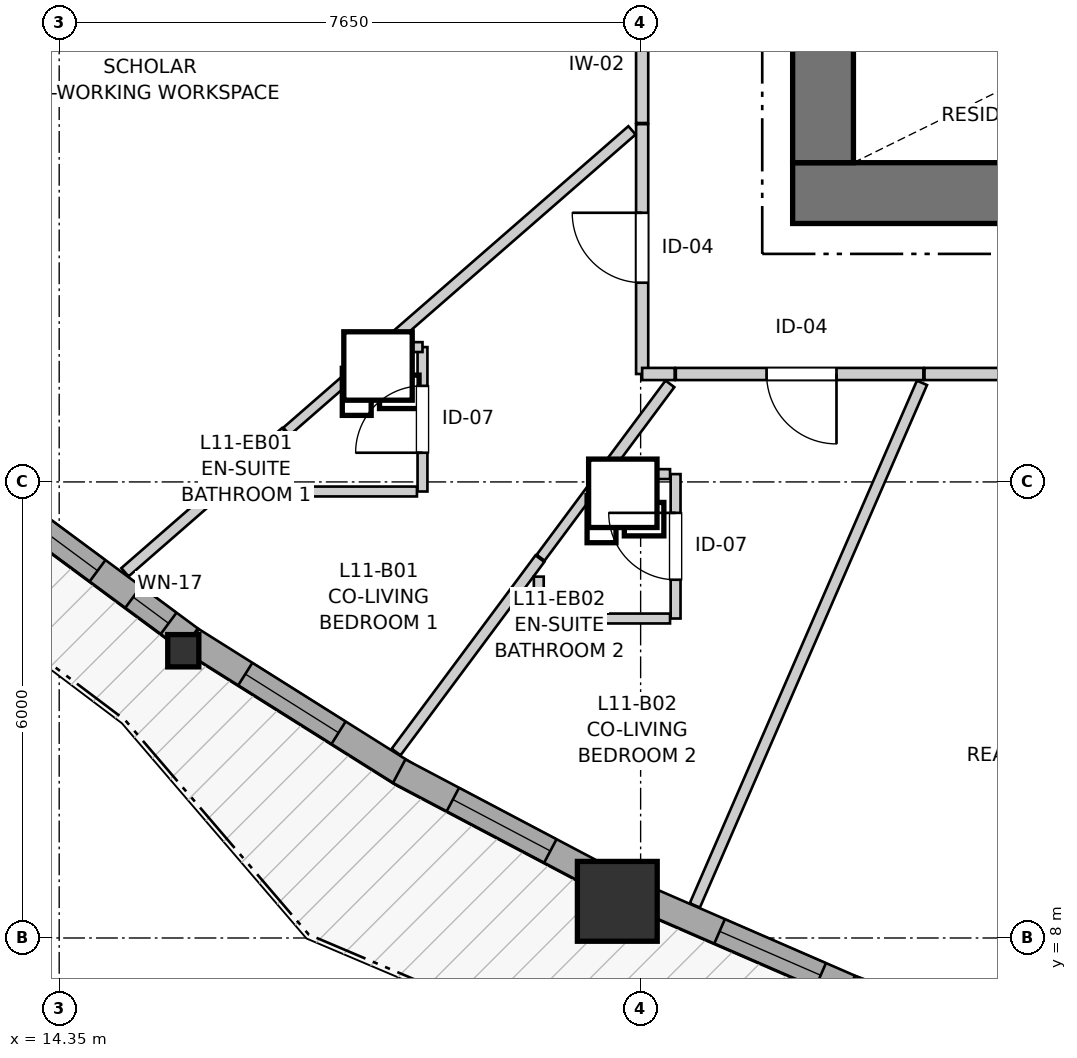
"""IFC4 building model, lengths in metres.
Left out: names, types, materials, properties, quantities, classifications, styles, units other than length and angle.
Written with IfcOpenShell. Run it as: python <this file> out.ifc"""

import sys

from ifc_helpers import new_model, si_unit, direction, frame, frame_2d, origin, origin_2d, place, context, subcontext, project, spatial, rectangle, i_section, extrude, source, transform, mapped, element, fill, save


model = new_model("IFC4")
c1 = context("Model", 3, precision=1e-05, world=origin(), true_north=direction((0.0, 1.0)))
c2 = subcontext(c1, "Body", "Model", "MODEL_VIEW")
j1 = project(units=[si_unit("LENGTHUNIT", "METRE"), si_unit("PLANEANGLEUNIT", "RADIAN")], contexts=[c1])
p1 = place(None, origin())
s1 = spatial("IfcSite", under=j1, at=p1, CompositionType="ELEMENT")
p2 = place(p1, origin())
s2 = spatial("IfcBuilding", under=s1, at=p2, CompositionType="ELEMENT")
p3 = place(p2, frame((0.0, 0.0, 39.8)))
s3 = spatial("IfcBuildingStorey", under=s2, at=p3, CompositionType="ELEMENT", Elevation=39.8)
p4 = place(p3, frame((24.0, 17.8, 0.0), z_axis=(0.0, 0.0, 1.0), x_axis=(1.0, 0.0, 0.0)))
e1 = element("IfcWall", 1, at=p4, inside=s3, PredefinedType="SHEAR", context=c2, shape_type="SweptSolid", body=[
    extrude(rectangle(XDim=12.7, YDim=0.8, at=frame_2d((6.35, 0.0))), origin(), (0.0, 0.0, 1.0), 2.94),
])
p5 = place(p3, frame((24.4, 33.8, 0.0), z_axis=(0.0, 0.0, 1.0), x_axis=(0.0, -1.0, 0.0)))
e2 = element("IfcWall", 2, at=p5, inside=s3, PredefinedType="SHEAR", context=c2, shape_type="SweptSolid", body=[
    extrude(rectangle(XDim=15.6, YDim=0.8, at=frame_2d((7.8, 0.0))), origin(), (0.0, 0.0, 1.0), 2.94),
])
p6 = place(p5, frame((7.05, 0.0, 0.0)))
e3 = element("IfcOpeningElement", 3, at=p6, cuts=e2, PredefinedType="OPENING", context=c2, shape_type="SweptSolid", body=[
    extrude(rectangle(XDim=1.5, YDim=2.15, at=frame_2d((0.75, 1.075))), frame((0.0, 0.41, 0.0), z_axis=(0.0, -1.0, 0.0), x_axis=(1.0, 0.0, 0.0)), (0.0, 0.0, 1.0), 0.82),
])
p7 = place(p5, frame((3.52, 0.0, 0.0)))
e4 = element("IfcOpeningElement", 4, at=p7, cuts=e2, PredefinedType="OPENING", context=c2, shape_type="SweptSolid", body=[
    extrude(rectangle(XDim=0.86, YDim=2.05, at=frame_2d((0.43, 1.025))), frame((0.0, 0.41, 0.0), z_axis=(0.0, -1.0, 0.0), x_axis=(1.0, 0.0, 0.0)), (0.0, 0.0, 1.0), 0.82),
])
p8 = place(p5, frame((11.22, 0.0, 0.0)))
e5 = element("IfcOpeningElement", 5, at=p8, cuts=e2, PredefinedType="OPENING", context=c2, shape_type="SweptSolid", body=[
    extrude(rectangle(XDim=0.86, YDim=2.05, at=frame_2d((0.43, 1.025))), frame((0.0, 0.41, 0.0), z_axis=(0.0, -1.0, 0.0), x_axis=(1.0, 0.0, 0.0)), (0.0, 0.0, 1.0), 0.82),
])
m1 = source(origin(), c2, "Body", "SweptSolid", [
    extrude(i_section(OverallWidth=0.409, OverallDepth=0.425, WebThickness=0.03, FlangeThickness=0.048, FilletRadius=0.015, at=origin_2d()), origin(), (0.0, 0.0, 1.0), 2.94),
])
p9 = place(p3, frame((15.983, 11.779, 0.0), z_axis=(0.0, 0.0, 1.0), x_axis=(1.0, 0.0, 0.0)))
e6 = element("IfcColumn", 6, at=p9, inside=s3, PredefinedType="PILASTER", context=c2, shape_type="MappedRepresentation", body=[
    mapped(m1, transform((0.0, 0.0, 0.0), x_axis=(1.0, 0.0, 0.0), y_axis=(0.0, 1.0, 0.0), z_axis=(0.0, 0.0, 1.0), scale=1.0)),
])
m2 = source(origin(), c2, "Body", "SweptSolid", [
    extrude(rectangle(XDim=1.05, YDim=1.05, at=origin_2d()), origin(), (0.0, 0.0, 1.0), 2.94),
])
p10 = place(p3, frame((21.693, 8.482, 0.0), z_axis=(0.0, 0.0, 1.0), x_axis=(1.0, 0.0, 0.0)))
e7 = element("IfcColumn", 7, at=p10, inside=s3, PredefinedType="COLUMN", context=c2, shape_type="MappedRepresentation", body=[
    mapped(m2, transform((0.0, 0.0, 0.0), x_axis=(1.0, 0.0, 0.0), y_axis=(0.0, 1.0, 0.0), z_axis=(0.0, 0.0, 1.0), scale=1.0)),
])
p11 = place(p3, frame((13.389, 13.917, 0.0), z_axis=(0.0, 0.0, 1.0), x_axis=(0.803777512245, -0.594930004966, 0.0)))
e8 = element("IfcWall", 8, at=p11, inside=s3, PredefinedType="SOLIDWALL", context=c2, shape_type="SweptSolid", body=[
    extrude(rectangle(XDim=3.336, YDim=0.35, at=frame_2d((1.668, 0.0))), origin(), (0.0, 0.0, 1.0), 2.42),
])
p12 = place(p11, frame((0.374, 0.0, 0.82)))
e9 = element("IfcOpeningElement", 9, at=p12, cuts=e8, PredefinedType="OPENING", context=c2, shape_type="SweptSolid", body=[
    extrude(rectangle(XDim=1.45, YDim=1.25, at=frame_2d((0.725, 0.625))), frame((0.0, 0.185, 0.0), z_axis=(0.0, -1.0, 0.0), x_axis=(1.0, 0.0, 0.0)), (0.0, 0.0, 1.0), 0.37),
])
p13 = place(p11, frame((2.407, 0.0, 0.82)))
e10 = element("IfcOpeningElement", 10, at=p13, cuts=e8, PredefinedType="OPENING", context=c2, shape_type="SweptSolid", body=[
    extrude(rectangle(XDim=0.58, YDim=1.35, at=frame_2d((0.29, 0.675))), frame((0.0, 0.185, 0.0), z_axis=(0.0, -1.0, 0.0), x_axis=(1.0, 0.0, 0.0)), (0.0, 0.0, 1.0), 0.37),
])
p14 = place(p3, frame((16.093, 11.917, 0.0), z_axis=(0.0, 0.0, 1.0), x_axis=(0.846444167315, -0.532477484612, 0.0)))
e11 = element("IfcWall", 11, at=p14, inside=s3, PredefinedType="SOLIDWALL", context=c2, shape_type="SweptSolid", body=[
    extrude(rectangle(XDim=3.317, YDim=0.35, at=frame_2d((1.659, 0.0))), origin(), (0.0, 0.0, 1.0), 2.42),
])
p15 = place(p14, frame((0.834, 0.0, 0.82)))
e12 = element("IfcOpeningElement", 12, at=p15, cuts=e11, PredefinedType="OPENING", context=c2, shape_type="SweptSolid", body=[
    extrude(rectangle(XDim=1.45, YDim=1.25, at=frame_2d((0.725, 0.625))), frame((0.0, 0.185, 0.0), z_axis=(0.0, -1.0, 0.0), x_axis=(1.0, 0.0, 0.0)), (0.0, 0.0, 1.0), 0.37),
])
p16 = place(p3, frame((18.823, 10.195, 0.0), z_axis=(0.0, 0.0, 1.0), x_axis=(0.884422538795, -0.466687018108, 0.0)))
e13 = element("IfcWall", 13, at=p16, inside=s3, PredefinedType="SOLIDWALL", context=c2, shape_type="SweptSolid", body=[
    extrude(rectangle(XDim=3.037, YDim=0.35, at=frame_2d((1.519, 0.0))), origin(), (0.0, 0.0, 1.0), 2.42),
])
p17 = place(p16, frame((0.799, 0.0, 0.82)))
e14 = element("IfcOpeningElement", 14, at=p17, cuts=e13, PredefinedType="OPENING", context=c2, shape_type="SweptSolid", body=[
    extrude(rectangle(XDim=1.45, YDim=1.25, at=frame_2d((0.725, 0.625))), frame((0.0, 0.185, 0.0), z_axis=(0.0, -1.0, 0.0), x_axis=(1.0, 0.0, 0.0)), (0.0, 0.0, 1.0), 0.37),
])
p18 = place(p3, frame((22.038, 8.523, 0.0), z_axis=(0.0, 0.0, 1.0), x_axis=(0.91704973522, -0.398772846535, 0.0)))
e15 = element("IfcWall", 15, at=p18, inside=s3, PredefinedType="SOLIDWALL", context=c2, shape_type="SweptSolid", body=[
    extrude(rectangle(XDim=3.056, YDim=0.35, at=frame_2d((1.528, 0.0))), origin(), (0.0, 0.0, 1.0), 2.42),
])
p19 = place(p18, frame((1.092, 0.0, 0.82)))
e16 = element("IfcOpeningElement", 16, at=p19, cuts=e15, PredefinedType="OPENING", context=c2, shape_type="SweptSolid", body=[
    extrude(rectangle(XDim=1.45, YDim=1.25, at=frame_2d((0.725, 0.625))), frame((0.0, 0.185, 0.0), z_axis=(0.0, -1.0, 0.0), x_axis=(1.0, 0.0, 0.0)), (0.0, 0.0, 1.0), 0.37),
])
p20 = place(p3, frame((24.758, 7.337, 0.0), z_axis=(0.0, 0.0, 1.0), x_axis=(0.944146789085, -0.329525174547, 0.0)))
e17 = element("IfcWall", 17, at=p20, inside=s3, PredefinedType="SOLIDWALL", context=c2, shape_type="SweptSolid", body=[
    extrude(rectangle(XDim=3.374, YDim=0.35, at=frame_2d((1.687, 0.0))), origin(), (0.0, 0.0, 1.0), 2.42),
])
p21 = place(p20, frame((0.647, 0.0, 0.82)))
e18 = element("IfcOpeningElement", 18, at=p21, cuts=e17, PredefinedType="OPENING", context=c2, shape_type="SweptSolid", body=[
    extrude(rectangle(XDim=2.1, YDim=1.4, at=frame_2d((1.05, 0.7))), frame((0.0, 0.185, 0.0), z_axis=(0.0, -1.0, 0.0), x_axis=(1.0, 0.0, 0.0)), (0.0, 0.0, 1.0), 0.37),
])
p22 = place(p3, frame((22.02, 18.722, 0.0), z_axis=(0.0, 0.0, 1.0), x_axis=(0.0, 1.0, 0.0)))
e19 = element("IfcWall", 19, at=p22, inside=s3, PredefinedType="PARTITIONING", context=c2, shape_type="SweptSolid", body=[
    extrude(rectangle(XDim=5.428, YDim=0.16, at=frame_2d((2.714, 0.0))), origin(), (0.0, 0.0, 1.0), 2.94),
])
p23 = place(p22, frame((1.996, 0.0, 0.0)))
e20 = element("IfcOpeningElement", 20, at=p23, cuts=e19, PredefinedType="OPENING", context=c2, shape_type="SweptSolid", body=[
    extrude(rectangle(XDim=0.96, YDim=2.1, at=frame_2d((0.48, 1.05))), frame((0.0, 0.09, 0.0), z_axis=(0.0, -1.0, 0.0), x_axis=(1.0, 0.0, 0.0)), (0.0, 0.0, 1.0), 0.18),
])
p24 = place(p3, frame((30.849, 15.42, 0.0), z_axis=(0.0, 0.0, 1.0), x_axis=(-1.0, 0.0, 0.0)))
e21 = element("IfcWall", 21, at=p24, inside=s3, PredefinedType="PARTITIONING", context=c2, shape_type="SweptSolid", body=[
    extrude(rectangle(XDim=5.114, YDim=0.16, at=frame_2d((2.557, 0.0))), origin(), (0.0, 0.0, 1.0), 2.94),
])
p25 = place(p24, frame((2.076, 0.0, 0.0)))
e22 = element("IfcOpeningElement", 22, at=p25, cuts=e21, PredefinedType="OPENING", context=c2, shape_type="SweptSolid", body=[
    extrude(rectangle(XDim=0.96, YDim=2.1, at=frame_2d((0.48, 1.05))), frame((0.0, 0.09, 0.0), z_axis=(0.0, -1.0, 0.0), x_axis=(1.0, 0.0, 0.0)), (0.0, 0.0, 1.0), 0.18),
])
p26 = place(p3, frame((22.02, 15.42, 0.0), z_axis=(0.0, 0.0, 1.0), x_axis=(0.0, 1.0, 0.0)))
e23 = element("IfcWall", 23, at=p26, inside=s3, PredefinedType="PARTITIONING", context=c2, shape_type="SweptSolid", body=[
    extrude(rectangle(XDim=3.287, YDim=0.16, at=frame_2d((1.644, 0.0))), origin(), (0.0, 0.0, 1.0), 2.94),
])
p27 = place(p26, frame((1.201, 0.0, 0.0)))
e24 = element("IfcOpeningElement", 24, at=p27, cuts=e23, PredefinedType="OPENING", context=c2, shape_type="SweptSolid", body=[
    extrude(rectangle(XDim=0.92, YDim=2.1, at=frame_2d((0.46, 1.05))), frame((0.0, 0.09, 0.0), z_axis=(0.0, -1.0, 0.0), x_axis=(1.0, 0.0, 0.0)), (0.0, 0.0, 1.0), 0.18),
])
p28 = place(p3, frame((25.72, 15.42, 0.0), z_axis=(0.0, 0.0, 1.0), x_axis=(-1.0, 0.0, 0.0)))
e25 = element("IfcWall", 25, at=p28, inside=s3, PredefinedType="PARTITIONING", context=c2, shape_type="SweptSolid", body=[
    extrude(rectangle(XDim=3.257, YDim=0.16, at=frame_2d((1.628, 0.0))), origin(), (0.0, 0.0, 1.0), 2.94),
])
p29 = place(p28, frame((1.143, 0.0, 0.0)))
e26 = element("IfcOpeningElement", 26, at=p29, cuts=e25, PredefinedType="OPENING", context=c2, shape_type="SweptSolid", body=[
    extrude(rectangle(XDim=0.92, YDim=2.1, at=frame_2d((0.46, 1.05))), frame((0.0, 0.09, 0.0), z_axis=(0.0, -1.0, 0.0), x_axis=(1.0, 0.0, 0.0)), (0.0, 0.0, 1.0), 0.18),
])
p30 = place(p3, frame((22.46, 12.203, 0.0), z_axis=(0.0, 0.0, 1.0), x_axis=(0.0, 1.0, 0.0)))
e27 = element("IfcWall", 27, at=p30, inside=s3, PredefinedType="PARTITIONING", context=c2, shape_type="SweptSolid", body=[
    extrude(rectangle(XDim=1.9, YDim=0.13, at=frame_2d((0.95, 0.0))), origin(), (0.0, 0.0, 1.0), 2.94),
])
p31 = place(p30, frame((0.51, 0.0, 0.0)))
e28 = element("IfcOpeningElement", 28, at=p31, cuts=e27, PredefinedType="OPENING", context=c2, shape_type="SweptSolid", body=[
    extrude(rectangle(XDim=0.88, YDim=2.05, at=frame_2d((0.44, 1.025))), frame((0.0, 0.075, 0.0), z_axis=(0.0, -1.0, 0.0), x_axis=(1.0, 0.0, 0.0)), (0.0, 0.0, 1.0), 0.15),
])
p32 = place(p3, frame((19.13, 13.874, 0.0), z_axis=(0.0, 0.0, 1.0), x_axis=(0.0, 1.0, 0.0)))
e29 = element("IfcWall", 29, at=p32, inside=s3, PredefinedType="PARTITIONING", context=c2, shape_type="SweptSolid", body=[
    extrude(rectangle(XDim=1.9, YDim=0.13, at=frame_2d((0.95, 0.0))), origin(), (0.0, 0.0, 1.0), 2.94),
])
p33 = place(p32, frame((0.51, 0.0, 0.0)))
e30 = element("IfcOpeningElement", 30, at=p33, cuts=e29, PredefinedType="OPENING", context=c2, shape_type="SweptSolid", body=[
    extrude(rectangle(XDim=0.88, YDim=2.05, at=frame_2d((0.44, 1.025))), frame((0.0, 0.075, 0.0), z_axis=(0.0, -1.0, 0.0), x_axis=(1.0, 0.0, 0.0)), (0.0, 0.0, 1.0), 0.15),
])
p34 = place(p3, frame((22.713, 8.429, 0.0), z_axis=(0.0, 0.0, 1.0), x_axis=(0.398615352261, 0.917118204454, 0.0)))
e31 = element("IfcWall", 31, at=p34, inside=s3, PredefinedType="PARTITIONING", context=c2, shape_type="SweptSolid", body=[
    extrude(rectangle(XDim=7.496, YDim=0.145, at=frame_2d((3.748, 0.0))), origin(), (0.0, 0.0, 1.0), 2.94),
])
p35 = place(p3, frame((18.614, 15.774, 0.0), z_axis=(0.0, 0.0, 1.0), x_axis=(0.753902736672, 0.656986045239, 0.0)))
e32 = element("IfcWall", 32, at=p35, inside=s3, PredefinedType="PARTITIONING", context=c2, shape_type="SweptSolid", body=[
    extrude(rectangle(XDim=4.34, YDim=0.145, at=frame_2d((2.17, 0.0))), origin(), (0.0, 0.0, 1.0), 2.94),
])
p36 = place(p3, frame((18.783, 10.447, 0.0), z_axis=(0.0, 0.0, 1.0), x_axis=(0.596791765516, 0.80239615441, 0.0)))
e33 = element("IfcWall", 33, at=p36, inside=s3, PredefinedType="PARTITIONING", context=c2, shape_type="SweptSolid", body=[
    extrude(rectangle(XDim=3.17, YDim=0.145, at=frame_2d((1.585, 0.0))), origin(), (0.0, 0.0, 1.0), 2.94),
])
p37 = place(p3, frame((15.215, 12.812, 0.0), z_axis=(0.0, 0.0, 1.0), x_axis=(0.753874404049, 0.657018555993, 0.0)))
e34 = element("IfcWall", 34, at=p37, inside=s3, PredefinedType="PARTITIONING", context=c2, shape_type="SweptSolid", body=[
    extrude(rectangle(XDim=2.805, YDim=0.145, at=frame_2d((1.403, 0.0))), origin(), (0.0, 0.0, 1.0), 2.94),
])
p38 = place(p3, frame((17.33, 13.874, 0.0), z_axis=(0.0, 0.0, 1.0), x_axis=(1.0, 0.0, 0.0)))
e35 = element("IfcWall", 35, at=p38, inside=s3, PredefinedType="PARTITIONING", context=c2, shape_type="SweptSolid", body=[
    extrude(rectangle(XDim=1.727, YDim=0.13, at=frame_2d((0.863, 0.0))), origin(), (0.0, 0.0, 1.0), 2.94),
])
p39 = place(p3, frame((20.66, 12.203, 0.0), z_axis=(0.0, 0.0, 1.0), x_axis=(1.0, 0.0, 0.0)))
e36 = element("IfcWall", 36, at=p39, inside=s3, PredefinedType="PARTITIONING", context=c2, shape_type="SweptSolid", body=[
    extrude(rectangle(XDim=1.727, YDim=0.13, at=frame_2d((0.864, 0.0))), origin(), (0.0, 0.0, 1.0), 2.94),
])
p40 = place(p3, frame((17.341, 14.665, 0.0), z_axis=(0.0, 0.0, 1.0), x_axis=(0.753885757535, 0.657005528581, 0.0)))
e37 = element("IfcWall", 37, at=p40, inside=s3, PredefinedType="PARTITIONING", context=c2, shape_type="SweptSolid", body=[
    extrude(rectangle(XDim=1.673, YDim=0.13, at=frame_2d((0.837, 0.0))), origin(), (0.0, 0.0, 1.0), 2.94),
])
p41 = place(p3, frame((21.491, 14.088, 0.0), z_axis=(0.0, 0.0, 1.0), x_axis=(0.596893728005, 0.802320308523, 0.0)))
e38 = element("IfcWall", 38, at=p41, inside=s3, PredefinedType="PARTITIONING", context=c2, shape_type="SweptSolid", body=[
    extrude(rectangle(XDim=1.499, YDim=0.145, at=frame_2d((0.749, 0.0))), origin(), (0.0, 0.0, 1.0), 2.94),
])
p42 = place(p3, frame((20.684, 13.003, 0.0), z_axis=(0.0, 0.0, 1.0), x_axis=(0.596518903615, 0.802599026681, 0.0)))
e39 = element("IfcWall", 39, at=p42, inside=s3, PredefinedType="PARTITIONING", context=c2, shape_type="SweptSolid", body=[
    extrude(rectangle(XDim=1.337, YDim=0.13, at=frame_2d((0.669, 0.0))), origin(), (0.0, 0.0, 1.0), 2.94),
])
p43 = place(p3, frame((21.649, 14.103, 0.0), z_axis=(0.0, 0.0, 1.0), x_axis=(1.0, 0.0, 0.0)))
e40 = element("IfcWall", 40, at=p43, inside=s3, PredefinedType="PARTITIONING", context=c2, shape_type="SweptSolid", body=[
    extrude(rectangle(XDim=0.738, YDim=0.13, at=frame_2d((0.369, 0.0))), origin(), (0.0, 0.0, 1.0), 2.94),
])
p44 = place(p3, frame((17.33, 13.947, 0.0), z_axis=(0.0, 0.0, 1.0), x_axis=(0.0, 1.0, 0.0)))
e41 = element("IfcWall", 41, at=p44, inside=s3, PredefinedType="PARTITIONING", context=c2, shape_type="SweptSolid", body=[
    extrude(rectangle(XDim=0.547, YDim=0.13, at=frame_2d((0.273, 0.0))), origin(), (0.0, 0.0, 1.0), 2.94),
])
p45 = place(p3, frame((20.66, 12.276, 0.0), z_axis=(0.0, 0.0, 1.0), x_axis=(0.0, 1.0, 0.0)))
e42 = element("IfcWall", 42, at=p45, inside=s3, PredefinedType="PARTITIONING", context=c2, shape_type="SweptSolid", body=[
    extrude(rectangle(XDim=0.478, YDim=0.13, at=frame_2d((0.239, 0.0))), origin(), (0.0, 0.0, 1.0), 2.94),
])
p46 = place(p3, frame((18.749, 15.774, 0.0), z_axis=(0.0, 0.0, 1.0), x_axis=(1.0, 0.0, 0.0)))
e43 = element("IfcWall", 43, at=p46, inside=s3, PredefinedType="PARTITIONING", context=c2, shape_type="SweptSolid", body=[
    extrude(rectangle(XDim=0.381, YDim=0.13, at=frame_2d((0.19, 0.0))), origin(), (0.0, 0.0, 1.0), 2.94),
])
p47 = place(p3, frame((22.02, 15.42, 0.0), z_axis=(0.0, 0.0, 1.0), x_axis=(1.0, 0.0, 0.0)))
e44 = element("IfcWall", 44, at=p47, inside=s3, PredefinedType="PARTITIONING", context=c2, shape_type="SweptSolid", body=[
    extrude(rectangle(XDim=0.428, YDim=0.16, at=frame_2d((0.214, 0.0))), origin(), (0.0, 0.0, 1.0), 2.94),
])
m3 = source(origin(), c2, "Body", "SweptSolid", [
    extrude(rectangle(XDim=1.45, YDim=1.25, at=frame_2d((0.725, 0.625))), frame((0.0, 0.03, 0.0), z_axis=(0.0, -1.0, 0.0), x_axis=(1.0, 0.0, 0.0)), (0.0, 0.0, 1.0), 0.06),
])
p48 = place(p12, origin())
e45 = element("IfcWindow", 45, at=p48, inside=s3, PartitioningType="SINGLE_PANEL", PredefinedType="WINDOW", context=c2, shape_type="MappedRepresentation", body=[
    mapped(m3, transform((0.0, 0.0, 0.0), x_axis=(1.0, 0.0, 0.0), y_axis=(0.0, 1.0, 0.0), z_axis=(0.0, 0.0, 1.0), scale=1.0)),
])
fill(e9, e45)
m4 = source(origin(), c2, "Body", "SweptSolid", [
    extrude(rectangle(XDim=0.58, YDim=1.35, at=frame_2d((0.29, 0.675))), frame((0.0, 0.03, 0.0), z_axis=(0.0, -1.0, 0.0), x_axis=(1.0, 0.0, 0.0)), (0.0, 0.0, 1.0), 0.06),
])
p49 = place(p13, origin())
e46 = element("IfcWindow", 46, at=p49, inside=s3, PartitioningType="SINGLE_PANEL", PredefinedType="WINDOW", context=c2, shape_type="MappedRepresentation", body=[
    mapped(m4, transform((0.0, 0.0, 0.0), x_axis=(1.0, 0.0, 0.0), y_axis=(0.0, 1.0, 0.0), z_axis=(0.0, 0.0, 1.0), scale=1.0)),
])
fill(e10, e46)
p50 = place(p15, origin())
e47 = element("IfcWindow", 47, at=p50, inside=s3, PartitioningType="SINGLE_PANEL", PredefinedType="WINDOW", context=c2, shape_type="MappedRepresentation", body=[
    mapped(m3, transform((0.0, 0.0, 0.0), x_axis=(1.0, 0.0, 0.0), y_axis=(0.0, 1.0, 0.0), z_axis=(0.0, 0.0, 1.0), scale=1.0)),
])
fill(e12, e47)
p51 = place(p17, origin())
e48 = element("IfcWindow", 48, at=p51, inside=s3, PartitioningType="SINGLE_PANEL", PredefinedType="WINDOW", context=c2, shape_type="MappedRepresentation", body=[
    mapped(m3, transform((0.0, 0.0, 0.0), x_axis=(1.0, 0.0, 0.0), y_axis=(0.0, 1.0, 0.0), z_axis=(0.0, 0.0, 1.0), scale=1.0)),
])
fill(e14, e48)
p52 = place(p19, origin())
e49 = element("IfcWindow", 49, at=p52, inside=s3, PartitioningType="SINGLE_PANEL", PredefinedType="WINDOW", context=c2, shape_type="MappedRepresentation", body=[
    mapped(m3, transform((0.0, 0.0, 0.0), x_axis=(1.0, 0.0, 0.0), y_axis=(0.0, 1.0, 0.0), z_axis=(0.0, 0.0, 1.0), scale=1.0)),
])
fill(e16, e49)
m5 = source(origin(), c2, "Body", "SweptSolid", [
    extrude(rectangle(XDim=0.92, YDim=2.1, at=frame_2d((0.46, 1.05))), frame((0.0, 0.025, 0.0), z_axis=(0.0, -1.0, 0.0), x_axis=(1.0, 0.0, 0.0)), (0.0, 0.0, 1.0), 0.05),
])
p53 = place(p27, origin())
e50 = element("IfcDoor", 50, at=p53, inside=s3, OperationType="SINGLE_SWING_RIGHT", PredefinedType="DOOR", context=c2, shape_type="MappedRepresentation", body=[
    mapped(m5, transform((0.0, 0.0, 0.0), x_axis=(1.0, 0.0, 0.0), y_axis=(0.0, 1.0, 0.0), z_axis=(0.0, 0.0, 1.0), scale=1.0)),
])
fill(e24, e50)
p54 = place(p29, origin())
e51 = element("IfcDoor", 51, at=p54, inside=s3, OperationType="SINGLE_SWING_LEFT", PredefinedType="DOOR", context=c2, shape_type="MappedRepresentation", body=[
    mapped(m5, transform((0.0, 0.0, 0.0), x_axis=(1.0, 0.0, 0.0), y_axis=(0.0, 1.0, 0.0), z_axis=(0.0, 0.0, 1.0), scale=1.0)),
])
fill(e26, e51)
m6 = source(origin(), c2, "Body", "SweptSolid", [
    extrude(rectangle(XDim=0.88, YDim=2.05, at=frame_2d((0.44, 1.025))), frame((0.0, 0.025, 0.0), z_axis=(0.0, -1.0, 0.0), x_axis=(1.0, 0.0, 0.0)), (0.0, 0.0, 1.0), 0.05),
])
p55 = place(p31, origin())
e52 = element("IfcDoor", 52, at=p55, inside=s3, OperationType="SINGLE_SWING_RIGHT", PredefinedType="DOOR", context=c2, shape_type="MappedRepresentation", body=[
    mapped(m6, transform((0.0, 0.0, 0.0), x_axis=(1.0, 0.0, 0.0), y_axis=(0.0, 1.0, 0.0), z_axis=(0.0, 0.0, 1.0), scale=1.0)),
])
fill(e28, e52)
p56 = place(p33, origin())
e53 = element("IfcDoor", 53, at=p56, inside=s3, OperationType="SINGLE_SWING_LEFT", PredefinedType="DOOR", context=c2, shape_type="MappedRepresentation", body=[
    mapped(m6, transform((0.0, 0.0, 0.0), x_axis=(1.0, 0.0, 0.0), y_axis=(0.0, 1.0, 0.0), z_axis=(0.0, 0.0, 1.0), scale=1.0)),
])
fill(e30, e53)
save(model, sys.argv[1])
